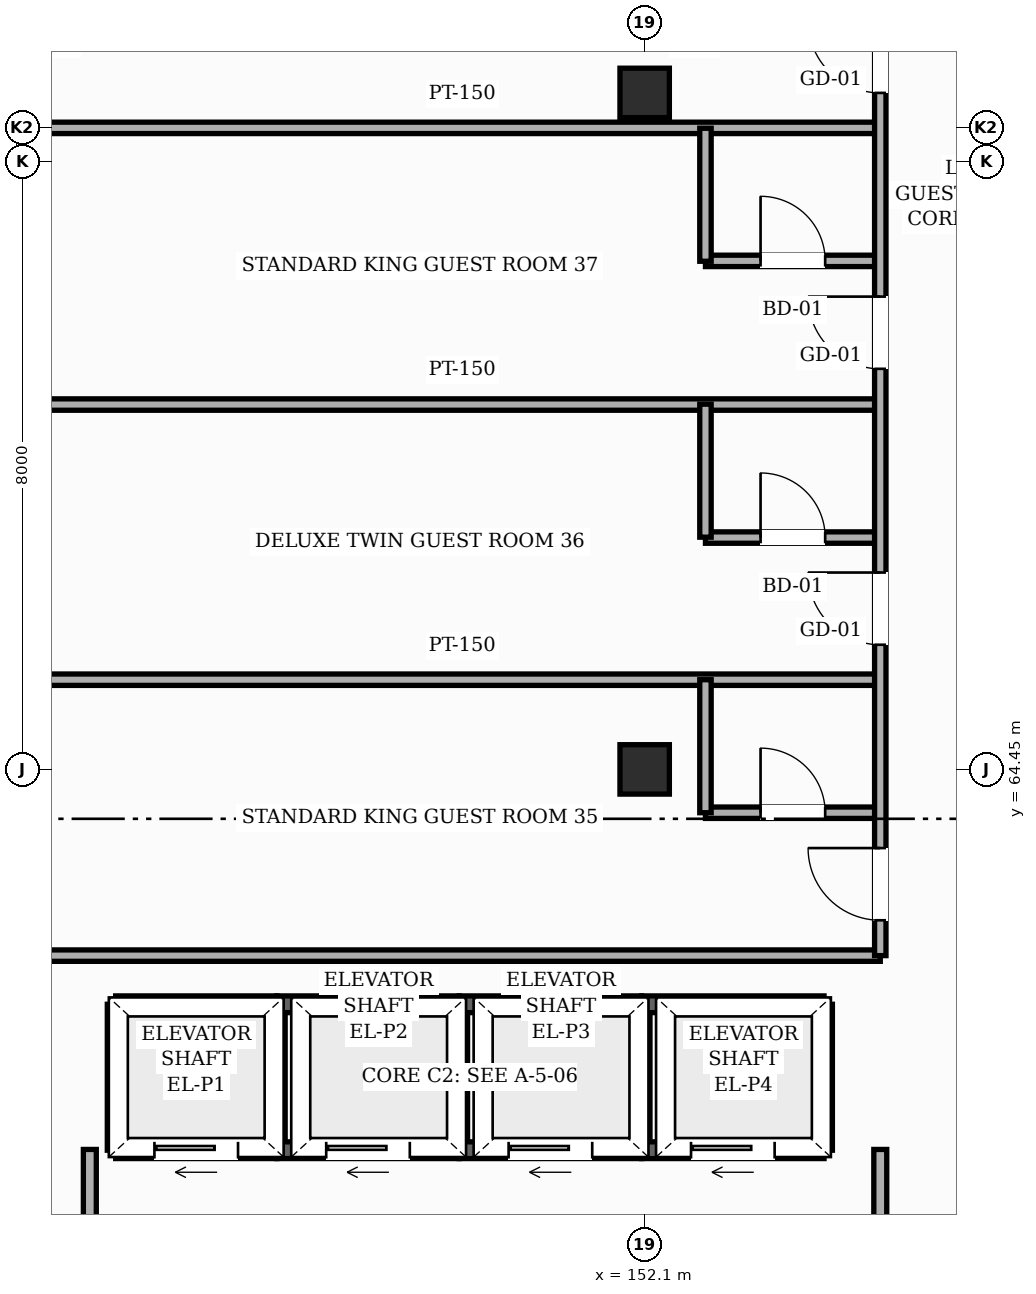
"""IFC4 building model, lengths in metres.
Left out: names, types, materials, properties, quantities, classifications, styles, units other than length and angle.
Written with IfcOpenShell. Run it as: python <this file> out.ifc"""

import sys

from ifc_helpers import new_model, si_unit, direction, frame, frame_2d, origin, origin_2d, place, context, subcontext, project, spatial, rectangle, hollow_rectangle, extrude, element, fill, save


model = new_model("IFC4")
c1 = context("Model", 3, precision=1e-05, world=origin(), true_north=direction((0.0, 1.0)))
c2 = subcontext(c1, "Body", "Model", "MODEL_VIEW")
j1 = project(units=[si_unit("LENGTHUNIT", "METRE"), si_unit("PLANEANGLEUNIT", "RADIAN")], contexts=[c1])
p1 = place(None, origin())
s1 = spatial("IfcSite", under=j1, at=p1, CompositionType="ELEMENT")
p2 = place(p1, origin())
s2 = spatial("IfcBuilding", under=s1, at=p2, CompositionType="ELEMENT")
p3 = place(p2, frame((0.0, 0.0, 19.8)))
s3 = spatial("IfcBuildingStorey", under=s2, at=p3, CompositionType="ELEMENT", Elevation=19.8)
p4 = place(p3, frame((152.1, 64.45, -0.24), z_axis=(0.0, 0.0, 1.0), x_axis=(1.0, 0.0, 0.0)))
e1 = element("IfcColumn", 1, at=p4, inside=s3, PredefinedType="COLUMN", context=c2, shape_type="SweptSolid", body=[
    extrude(hollow_rectangle(XDim=0.65, YDim=0.65, WallThickness=0.025, InnerFilletRadius=0.025, OuterFilletRadius=0.05, at=origin_2d()), origin(), (0.0, 0.0, 1.0), 5.04),
])
p5 = place(p3, frame((152.1, 73.35, 0.0), z_axis=(0.0, 0.0, 1.0), x_axis=(1.0, 0.0, 0.0)))
e2 = element("IfcColumn", 2, at=p5, inside=s3, PredefinedType="COLUMN", context=c2, shape_type="SweptSolid", body=[
    extrude(hollow_rectangle(XDim=0.65, YDim=0.65, WallThickness=0.025, InnerFilletRadius=0.025, OuterFilletRadius=0.05, at=origin_2d()), origin(), (0.0, 0.0, 1.0), 4.8),
])
p6 = place(p3, frame((145.14, 61.36, 0.0), z_axis=(0.0, 0.0, 1.0), x_axis=(1.0, 0.0, 0.0)))
e3 = element("IfcWall", 3, at=p6, inside=s3, PredefinedType="SHEAR", context=c2, shape_type="SweptSolid", body=[
    extrude(rectangle(XDim=2.12, YDim=0.22, at=frame_2d((1.06, 0.0))), origin(), (0.0, 0.0, 1.0), 4.58),
])
p7 = place(p3, frame((145.14, 59.44, 0.0), z_axis=(0.0, 0.0, 1.0), x_axis=(1.0, 0.0, 0.0)))
e4 = element("IfcWall", 4, at=p7, inside=s3, PredefinedType="SHEAR", context=c2, shape_type="SweptSolid", body=[
    extrude(rectangle(XDim=2.12, YDim=0.22, at=frame_2d((1.06, 0.0))), origin(), (0.0, 0.0, 1.0), 4.58),
])
p8 = place(p7, frame((0.51, 0.0, 0.0)))
e5 = element("IfcOpeningElement", 5, at=p8, cuts=e4, PredefinedType="OPENING", context=c2, shape_type="SweptSolid", body=[
    extrude(rectangle(XDim=1.1, YDim=2.2, at=frame_2d((0.55, 1.1))), frame((0.0, 0.12, 0.0), z_axis=(0.0, -1.0, 0.0), x_axis=(1.0, 0.0, 0.0)), (0.0, 0.0, 1.0), 0.24),
])
for number, where, z_axis, x_axis in (
    (6, (147.26, 59.44, 0.0), (0.0, 0.0, 1.0), (0.0, 1.0, 0.0)),
    (7, (145.14, 59.44, 0.0), (0.0, 0.0, 1.0), (0.0, 1.0, 0.0)),
):
    element("IfcWall", number, at=place(p3, frame(where, z_axis=z_axis, x_axis=x_axis)), inside=s3, PredefinedType="SHEAR", context=c2, shape_type="SweptSolid", body=[
        extrude(rectangle(XDim=1.92, YDim=0.22, at=frame_2d((0.96, 0.0))), origin(), (0.0, 0.0, 1.0), 4.58),
    ])
p9 = place(p3, frame((147.26, 61.36, 0.0), z_axis=(0.0, 0.0, 1.0), x_axis=(1.0, 0.0, 0.0)))
e8 = element("IfcWall", 8, at=p9, inside=s3, PredefinedType="SHEAR", context=c2, shape_type="SweptSolid", body=[
    extrude(rectangle(XDim=2.4, YDim=0.22, at=frame_2d((1.2, 0.0))), origin(), (0.0, 0.0, 1.0), 4.58),
])
p10 = place(p3, frame((147.26, 59.44, 0.0), z_axis=(0.0, 0.0, 1.0), x_axis=(1.0, 0.0, 0.0)))
e9 = element("IfcWall", 9, at=p10, inside=s3, PredefinedType="SHEAR", context=c2, shape_type="SweptSolid", body=[
    extrude(rectangle(XDim=2.4, YDim=0.22, at=frame_2d((1.2, 0.0))), origin(), (0.0, 0.0, 1.0), 4.58),
])
p11 = place(p10, frame((0.65, 0.0, 0.0)))
e10 = element("IfcOpeningElement", 10, at=p11, cuts=e9, PredefinedType="OPENING", context=c2, shape_type="SweptSolid", body=[
    extrude(rectangle(XDim=1.1, YDim=2.2, at=frame_2d((0.55, 1.1))), frame((0.0, 0.12, 0.0), z_axis=(0.0, -1.0, 0.0), x_axis=(1.0, 0.0, 0.0)), (0.0, 0.0, 1.0), 0.24),
])
p12 = place(p3, frame((149.66, 59.44, 0.0), z_axis=(0.0, 0.0, 1.0), x_axis=(0.0, 1.0, 0.0)))
e11 = element("IfcWall", 11, at=p12, inside=s3, PredefinedType="SHEAR", context=c2, shape_type="SweptSolid", body=[
    extrude(rectangle(XDim=1.92, YDim=0.22, at=frame_2d((0.96, 0.0))), origin(), (0.0, 0.0, 1.0), 4.58),
])
p13 = place(p3, frame((149.66, 61.36, 0.0), z_axis=(0.0, 0.0, 1.0), x_axis=(1.0, 0.0, 0.0)))
e12 = element("IfcWall", 12, at=p13, inside=s3, PredefinedType="SHEAR", context=c2, shape_type="SweptSolid", body=[
    extrude(rectangle(XDim=2.4, YDim=0.22, at=frame_2d((1.2, 0.0))), origin(), (0.0, 0.0, 1.0), 4.58),
])
p14 = place(p3, frame((149.66, 59.44, 0.0), z_axis=(0.0, 0.0, 1.0), x_axis=(1.0, 0.0, 0.0)))
e13 = element("IfcWall", 13, at=p14, inside=s3, PredefinedType="SHEAR", context=c2, shape_type="SweptSolid", body=[
    extrude(rectangle(XDim=2.4, YDim=0.22, at=frame_2d((1.2, 0.0))), origin(), (0.0, 0.0, 1.0), 4.58),
])
p15 = place(p14, frame((0.65, 0.0, 0.0)))
e14 = element("IfcOpeningElement", 14, at=p15, cuts=e13, PredefinedType="OPENING", context=c2, shape_type="SweptSolid", body=[
    extrude(rectangle(XDim=1.1, YDim=2.2, at=frame_2d((0.55, 1.1))), frame((0.0, 0.12, 0.0), z_axis=(0.0, -1.0, 0.0), x_axis=(1.0, 0.0, 0.0)), (0.0, 0.0, 1.0), 0.24),
])
p16 = place(p3, frame((152.06, 59.44, 0.0), z_axis=(0.0, 0.0, 1.0), x_axis=(0.0, 1.0, 0.0)))
e15 = element("IfcWall", 15, at=p16, inside=s3, PredefinedType="SHEAR", context=c2, shape_type="SweptSolid", body=[
    extrude(rectangle(XDim=1.92, YDim=0.22, at=frame_2d((0.96, 0.0))), origin(), (0.0, 0.0, 1.0), 4.58),
])
p17 = place(p3, frame((152.06, 61.36, 0.0), z_axis=(0.0, 0.0, 1.0), x_axis=(1.0, 0.0, 0.0)))
e16 = element("IfcWall", 16, at=p17, inside=s3, PredefinedType="SHEAR", context=c2, shape_type="SweptSolid", body=[
    extrude(rectangle(XDim=2.4, YDim=0.22, at=frame_2d((1.2, 0.0))), origin(), (0.0, 0.0, 1.0), 4.58),
])
p18 = place(p3, frame((152.06, 59.44, 0.0), z_axis=(0.0, 0.0, 1.0), x_axis=(1.0, 0.0, 0.0)))
e17 = element("IfcWall", 17, at=p18, inside=s3, PredefinedType="SHEAR", context=c2, shape_type="SweptSolid", body=[
    extrude(rectangle(XDim=2.4, YDim=0.22, at=frame_2d((1.2, 0.0))), origin(), (0.0, 0.0, 1.0), 4.58),
])
p19 = place(p18, frame((0.65, 0.0, 0.0)))
e18 = element("IfcOpeningElement", 18, at=p19, cuts=e17, PredefinedType="OPENING", context=c2, shape_type="SweptSolid", body=[
    extrude(rectangle(XDim=1.1, YDim=2.2, at=frame_2d((0.55, 1.1))), frame((0.0, 0.12, 0.0), z_axis=(0.0, -1.0, 0.0), x_axis=(1.0, 0.0, 0.0)), (0.0, 0.0, 1.0), 0.24),
])
p20 = place(p3, frame((154.46, 59.44, 0.0), z_axis=(0.0, 0.0, 1.0), x_axis=(0.0, 1.0, 0.0)))
e19 = element("IfcWall", 19, at=p20, inside=s3, PredefinedType="SHEAR", context=c2, shape_type="SweptSolid", body=[
    extrude(rectangle(XDim=1.92, YDim=0.22, at=frame_2d((0.96, 0.0))), origin(), (0.0, 0.0, 1.0), 4.58),
])
p21 = place(p3, frame((144.2, 62.0, 0.0), z_axis=(0.0, 0.0, 1.0), x_axis=(1.0, 0.0, 0.0)))
e20 = element("IfcWall", 20, at=p21, inside=s3, PredefinedType="PARTITIONING", context=c2, shape_type="SweptSolid", body=[
    extrude(rectangle(XDim=11.0, YDim=0.15, at=frame_2d((5.5, 0.0))), origin(), (0.0, 0.0, 1.0), 4.565),
])
p22 = place(p3, frame((152.9, 63.88, 0.0), z_axis=(0.0, 0.0, 1.0), x_axis=(1.0, 0.0, 0.0)))
e21 = element("IfcWall", 21, at=p22, inside=s3, PredefinedType="PARTITIONING", context=c2, shape_type="SweptSolid", body=[
    extrude(rectangle(XDim=2.3, YDim=0.15, at=frame_2d((1.15, 0.0))), origin(), (0.0, 0.0, 1.0), 4.565),
])
p23 = place(p22, frame((0.725, 0.0, 0.0)))
e22 = element("IfcOpeningElement", 22, at=p23, cuts=e21, PredefinedType="OPENING", context=c2, shape_type="SweptSolid", body=[
    extrude(rectangle(XDim=0.85, YDim=2.1, at=frame_2d((0.425, 1.05))), frame((0.0, 0.085, 0.0), z_axis=(0.0, -1.0, 0.0), x_axis=(1.0, 0.0, 0.0)), (0.0, 0.0, 1.0), 0.17),
])
p24 = place(p3, frame((144.2, 65.63, 0.0), z_axis=(0.0, 0.0, 1.0), x_axis=(1.0, 0.0, 0.0)))
e23 = element("IfcWall", 23, at=p24, inside=s3, PredefinedType="PARTITIONING", context=c2, shape_type="SweptSolid", body=[
    extrude(rectangle(XDim=11.0, YDim=0.15, at=frame_2d((5.5, 0.0))), origin(), (0.0, 0.0, 1.0), 4.565),
])
p25 = place(p3, frame((152.9, 67.5, 0.0), z_axis=(0.0, 0.0, 1.0), x_axis=(1.0, 0.0, 0.0)))
e24 = element("IfcWall", 24, at=p25, inside=s3, PredefinedType="PARTITIONING", context=c2, shape_type="SweptSolid", body=[
    extrude(rectangle(XDim=2.3, YDim=0.15, at=frame_2d((1.15, 0.0))), origin(), (0.0, 0.0, 1.0), 4.565),
])
p26 = place(p25, frame((0.725, 0.0, 0.0)))
e25 = element("IfcOpeningElement", 25, at=p26, cuts=e24, PredefinedType="OPENING", context=c2, shape_type="SweptSolid", body=[
    extrude(rectangle(XDim=0.85, YDim=2.1, at=frame_2d((0.425, 1.05))), frame((0.0, 0.085, 0.0), z_axis=(0.0, -1.0, 0.0), x_axis=(1.0, 0.0, 0.0)), (0.0, 0.0, 1.0), 0.17),
])
p27 = place(p3, frame((144.2, 69.25, 0.0), z_axis=(0.0, 0.0, 1.0), x_axis=(1.0, 0.0, 0.0)))
e26 = element("IfcWall", 26, at=p27, inside=s3, PredefinedType="PARTITIONING", context=c2, shape_type="SweptSolid", body=[
    extrude(rectangle(XDim=11.0, YDim=0.15, at=frame_2d((5.5, 0.0))), origin(), (0.0, 0.0, 1.0), 4.565),
])
p28 = place(p3, frame((152.9, 71.14, 0.0), z_axis=(0.0, 0.0, 1.0), x_axis=(1.0, 0.0, 0.0)))
e27 = element("IfcWall", 27, at=p28, inside=s3, PredefinedType="PARTITIONING", context=c2, shape_type="SweptSolid", body=[
    extrude(rectangle(XDim=2.3, YDim=0.15, at=frame_2d((1.15, 0.0))), origin(), (0.0, 0.0, 1.0), 4.565),
])
p29 = place(p28, frame((0.725, 0.0, 0.0)))
e28 = element("IfcOpeningElement", 28, at=p29, cuts=e27, PredefinedType="OPENING", context=c2, shape_type="SweptSolid", body=[
    extrude(rectangle(XDim=0.85, YDim=2.1, at=frame_2d((0.425, 1.05))), frame((0.0, 0.085, 0.0), z_axis=(0.0, -1.0, 0.0), x_axis=(1.0, 0.0, 0.0)), (0.0, 0.0, 1.0), 0.17),
])
p30 = place(p3, frame((144.2, 72.89, 0.0), z_axis=(0.0, 0.0, 1.0), x_axis=(1.0, 0.0, 0.0)))
e29 = element("IfcWall", 29, at=p30, inside=s3, PredefinedType="PARTITIONING", context=c2, shape_type="SweptSolid", body=[
    extrude(rectangle(XDim=11.0, YDim=0.15, at=frame_2d((5.5, 0.0))), origin(), (0.0, 0.0, 1.0), 4.565),
])
p31 = place(p3, frame((144.8, 53.0, 0.0), z_axis=(0.0, 0.0, 1.0), x_axis=(0.0, 1.0, 0.0)))
e30 = element("IfcWall", 30, at=p31, inside=s3, PredefinedType="PARTITIONING", context=c2, shape_type="SweptSolid", body=[
    extrude(rectangle(XDim=6.45, YDim=0.17, at=frame_2d((3.225, 0.0))), origin(), (0.0, 0.0, 1.0), 4.565),
])
for number, where, z_axis, x_axis in (
    (31, (152.9, 63.88, 0.0), (0.0, 0.0, 1.0), (0.0, 1.0, 0.0)),
    (32, (152.9, 67.505, 0.0), (0.0, 0.0, 1.0), (0.0, 1.0, 0.0)),
    (33, (152.9, 71.135, 0.0), (0.0, 0.0, 1.0), (0.0, 1.0, 0.0)),
):
    element("IfcWall", number, at=place(p3, frame(where, z_axis=z_axis, x_axis=x_axis)), inside=s3, PredefinedType="PARTITIONING", context=c2, shape_type="SweptSolid", body=[
        extrude(rectangle(XDim=1.75, YDim=0.15, at=frame_2d((0.875, 0.0))), origin(), (0.0, 0.0, 1.0), 4.565),
    ])
p32 = place(p3, frame((155.2, 53.0, 0.0), z_axis=(0.0, 0.0, 1.0), x_axis=(0.0, 1.0, 0.0)))
e34 = element("IfcWall", 34, at=p32, inside=s3, PredefinedType="PARTITIONING", context=c2, shape_type="SweptSolid", body=[
    extrude(rectangle(XDim=6.45, YDim=0.17, at=frame_2d((3.225, 0.0))), origin(), (0.0, 0.0, 1.0), 4.565),
])
p33 = place(p32, frame((2.625, 0.0, 0.0)))
e35 = element("IfcOpeningElement", 35, at=p33, cuts=e34, PredefinedType="OPENING", context=c2, shape_type="SweptSolid", body=[
    extrude(rectangle(XDim=1.2, YDim=2.2, at=frame_2d((0.6, 1.1))), frame((0.0, 0.095, 0.0), z_axis=(0.0, -1.0, 0.0), x_axis=(1.0, 0.0, 0.0)), (0.0, 0.0, 1.0), 0.19),
])
p34 = place(p3, frame((155.2, 62.0, 0.0), z_axis=(0.0, 0.0, 1.0), x_axis=(0.0, 1.0, 0.0)))
e36 = element("IfcWall", 36, at=p34, inside=s3, PredefinedType="PARTITIONING", context=c2, shape_type="SweptSolid", body=[
    extrude(rectangle(XDim=50.8, YDim=0.15, at=frame_2d((25.4, 0.0))), origin(), (0.0, 0.0, 1.0), 4.565),
])
p35 = place(p34, frame((0.465, 0.0, 0.0)))
e37 = element("IfcOpeningElement", 37, at=p35, cuts=e36, PredefinedType="OPENING", context=c2, shape_type="SweptSolid", body=[
    extrude(rectangle(XDim=0.95, YDim=2.15, at=frame_2d((0.475, 1.075))), frame((0.0, 0.085, 0.0), z_axis=(0.0, -1.0, 0.0), x_axis=(1.0, 0.0, 0.0)), (0.0, 0.0, 1.0), 0.17),
])
p36 = place(p34, frame((4.09, 0.0, 0.0)))
e38 = element("IfcOpeningElement", 38, at=p36, cuts=e36, PredefinedType="OPENING", context=c2, shape_type="SweptSolid", body=[
    extrude(rectangle(XDim=0.95, YDim=2.15, at=frame_2d((0.475, 1.075))), frame((0.0, 0.085, 0.0), z_axis=(0.0, -1.0, 0.0), x_axis=(1.0, 0.0, 0.0)), (0.0, 0.0, 1.0), 0.17),
])
p37 = place(p34, frame((7.72, 0.0, 0.0)))
e39 = element("IfcOpeningElement", 39, at=p37, cuts=e36, PredefinedType="OPENING", context=c2, shape_type="SweptSolid", body=[
    extrude(rectangle(XDim=0.95, YDim=2.15, at=frame_2d((0.475, 1.075))), frame((0.0, 0.085, 0.0), z_axis=(0.0, -1.0, 0.0), x_axis=(1.0, 0.0, 0.0)), (0.0, 0.0, 1.0), 0.17),
])
p38 = place(p34, frame((11.35, 0.0, 0.0)))
e40 = element("IfcOpeningElement", 40, at=p38, cuts=e36, PredefinedType="OPENING", context=c2, shape_type="SweptSolid", body=[
    extrude(rectangle(XDim=0.95, YDim=2.15, at=frame_2d((0.475, 1.075))), frame((0.0, 0.085, 0.0), z_axis=(0.0, -1.0, 0.0), x_axis=(1.0, 0.0, 0.0)), (0.0, 0.0, 1.0), 0.17),
])
p39 = place(p34, frame((14.98, 0.0, 0.0)))
e41 = element("IfcOpeningElement", 41, at=p39, cuts=e36, PredefinedType="OPENING", context=c2, shape_type="SweptSolid", body=[
    extrude(rectangle(XDim=0.95, YDim=2.15, at=frame_2d((0.475, 1.075))), frame((0.0, 0.085, 0.0), z_axis=(0.0, -1.0, 0.0), x_axis=(1.0, 0.0, 0.0)), (0.0, 0.0, 1.0), 0.17),
])
p40 = place(p34, frame((18.61, 0.0, 0.0)))
e42 = element("IfcOpeningElement", 42, at=p40, cuts=e36, PredefinedType="OPENING", context=c2, shape_type="SweptSolid", body=[
    extrude(rectangle(XDim=0.95, YDim=2.15, at=frame_2d((0.475, 1.075))), frame((0.0, 0.085, 0.0), z_axis=(0.0, -1.0, 0.0), x_axis=(1.0, 0.0, 0.0)), (0.0, 0.0, 1.0), 0.17),
])
p41 = place(p34, frame((22.235, 0.0, 0.0)))
e43 = element("IfcOpeningElement", 43, at=p41, cuts=e36, PredefinedType="OPENING", context=c2, shape_type="SweptSolid", body=[
    extrude(rectangle(XDim=0.95, YDim=2.15, at=frame_2d((0.475, 1.075))), frame((0.0, 0.085, 0.0), z_axis=(0.0, -1.0, 0.0), x_axis=(1.0, 0.0, 0.0)), (0.0, 0.0, 1.0), 0.17),
])
p42 = place(p34, frame((25.865, 0.0, 0.0)))
e44 = element("IfcOpeningElement", 44, at=p42, cuts=e36, PredefinedType="OPENING", context=c2, shape_type="SweptSolid", body=[
    extrude(rectangle(XDim=0.95, YDim=2.15, at=frame_2d((0.475, 1.075))), frame((0.0, 0.085, 0.0), z_axis=(0.0, -1.0, 0.0), x_axis=(1.0, 0.0, 0.0)), (0.0, 0.0, 1.0), 0.17),
])
p43 = place(p34, frame((29.49, 0.0, 0.0)))
e45 = element("IfcOpeningElement", 45, at=p43, cuts=e36, PredefinedType="OPENING", context=c2, shape_type="SweptSolid", body=[
    extrude(rectangle(XDim=0.95, YDim=2.15, at=frame_2d((0.475, 1.075))), frame((0.0, 0.085, 0.0), z_axis=(0.0, -1.0, 0.0), x_axis=(1.0, 0.0, 0.0)), (0.0, 0.0, 1.0), 0.17),
])
p44 = place(p34, frame((33.12, 0.0, 0.0)))
e46 = element("IfcOpeningElement", 46, at=p44, cuts=e36, PredefinedType="OPENING", context=c2, shape_type="SweptSolid", body=[
    extrude(rectangle(XDim=0.95, YDim=2.15, at=frame_2d((0.475, 1.075))), frame((0.0, 0.085, 0.0), z_axis=(0.0, -1.0, 0.0), x_axis=(1.0, 0.0, 0.0)), (0.0, 0.0, 1.0), 0.17),
])
p45 = place(p34, frame((36.75, 0.0, 0.0)))
e47 = element("IfcOpeningElement", 47, at=p45, cuts=e36, PredefinedType="OPENING", context=c2, shape_type="SweptSolid", body=[
    extrude(rectangle(XDim=0.95, YDim=2.15, at=frame_2d((0.475, 1.075))), frame((0.0, 0.085, 0.0), z_axis=(0.0, -1.0, 0.0), x_axis=(1.0, 0.0, 0.0)), (0.0, 0.0, 1.0), 0.17),
])
p46 = place(p34, frame((40.38, 0.0, 0.0)))
e48 = element("IfcOpeningElement", 48, at=p46, cuts=e36, PredefinedType="OPENING", context=c2, shape_type="SweptSolid", body=[
    extrude(rectangle(XDim=0.95, YDim=2.15, at=frame_2d((0.475, 1.075))), frame((0.0, 0.085, 0.0), z_axis=(0.0, -1.0, 0.0), x_axis=(1.0, 0.0, 0.0)), (0.0, 0.0, 1.0), 0.17),
])
p47 = place(p34, frame((44.01, 0.0, 0.0)))
e49 = element("IfcOpeningElement", 49, at=p47, cuts=e36, PredefinedType="OPENING", context=c2, shape_type="SweptSolid", body=[
    extrude(rectangle(XDim=0.95, YDim=2.15, at=frame_2d((0.475, 1.075))), frame((0.0, 0.085, 0.0), z_axis=(0.0, -1.0, 0.0), x_axis=(1.0, 0.0, 0.0)), (0.0, 0.0, 1.0), 0.17),
])
p48 = place(p34, frame((47.635, 0.0, 0.0)))
e50 = element("IfcOpeningElement", 50, at=p48, cuts=e36, PredefinedType="OPENING", context=c2, shape_type="SweptSolid", body=[
    extrude(rectangle(XDim=0.95, YDim=2.15, at=frame_2d((0.475, 1.075))), frame((0.0, 0.085, 0.0), z_axis=(0.0, -1.0, 0.0), x_axis=(1.0, 0.0, 0.0)), (0.0, 0.0, 1.0), 0.17),
])
p49 = place(p8, origin())
e51 = element("IfcDoor", 51, at=p49, inside=s3, OperationType="SLIDING_TO_LEFT", PredefinedType="DOOR", context=c2, shape_type="SweptSolid", body=[
    extrude(rectangle(XDim=1.1, YDim=2.2, at=frame_2d((0.55, 1.1))), frame((0.0, 0.025, 0.0), z_axis=(0.0, -1.0, 0.0), x_axis=(1.0, 0.0, 0.0)), (0.0, 0.0, 1.0), 0.05),
])
fill(e5, e51)
p50 = place(p11, origin())
e52 = element("IfcDoor", 52, at=p50, inside=s3, OperationType="SLIDING_TO_LEFT", PredefinedType="DOOR", context=c2, shape_type="SweptSolid", body=[
    extrude(rectangle(XDim=1.1, YDim=2.2, at=frame_2d((0.55, 1.1))), frame((0.0, 0.025, 0.0), z_axis=(0.0, -1.0, 0.0), x_axis=(1.0, 0.0, 0.0)), (0.0, 0.0, 1.0), 0.05),
])
fill(e10, e52)
p51 = place(p15, origin())
e53 = element("IfcDoor", 53, at=p51, inside=s3, OperationType="SLIDING_TO_LEFT", PredefinedType="DOOR", context=c2, shape_type="SweptSolid", body=[
    extrude(rectangle(XDim=1.1, YDim=2.2, at=frame_2d((0.55, 1.1))), frame((0.0, 0.025, 0.0), z_axis=(0.0, -1.0, 0.0), x_axis=(1.0, 0.0, 0.0)), (0.0, 0.0, 1.0), 0.05),
])
fill(e14, e53)
p52 = place(p19, origin())
e54 = element("IfcDoor", 54, at=p52, inside=s3, OperationType="SLIDING_TO_LEFT", PredefinedType="DOOR", context=c2, shape_type="SweptSolid", body=[
    extrude(rectangle(XDim=1.1, YDim=2.2, at=frame_2d((0.55, 1.1))), frame((0.0, 0.025, 0.0), z_axis=(0.0, -1.0, 0.0), x_axis=(1.0, 0.0, 0.0)), (0.0, 0.0, 1.0), 0.05),
])
fill(e18, e54)
p53 = place(p35, origin())
e55 = element("IfcDoor", 55, at=p53, inside=s3, OperationType="SINGLE_SWING_RIGHT", PredefinedType="DOOR", context=c2, shape_type="SweptSolid", body=[
    extrude(rectangle(XDim=0.95, YDim=2.15, at=frame_2d((0.475, 1.075))), frame((0.0, 0.025, 0.0), z_axis=(0.0, -1.0, 0.0), x_axis=(1.0, 0.0, 0.0)), (0.0, 0.0, 1.0), 0.05),
])
fill(e37, e55)
p54 = place(p23, origin())
e56 = element("IfcDoor", 56, at=p54, inside=s3, OperationType="SINGLE_SWING_LEFT", PredefinedType="DOOR", context=c2, shape_type="SweptSolid", body=[
    extrude(rectangle(XDim=0.85, YDim=2.1, at=frame_2d((0.425, 1.05))), frame((0.0, 0.025, 0.0), z_axis=(0.0, -1.0, 0.0), x_axis=(1.0, 0.0, 0.0)), (0.0, 0.0, 1.0), 0.05),
])
fill(e22, e56)
p55 = place(p36, origin())
e57 = element("IfcDoor", 57, at=p55, inside=s3, OperationType="SINGLE_SWING_RIGHT", PredefinedType="DOOR", context=c2, shape_type="SweptSolid", body=[
    extrude(rectangle(XDim=0.95, YDim=2.15, at=frame_2d((0.475, 1.075))), frame((0.0, 0.025, 0.0), z_axis=(0.0, -1.0, 0.0), x_axis=(1.0, 0.0, 0.0)), (0.0, 0.0, 1.0), 0.05),
])
fill(e38, e57)
p56 = place(p26, origin())
e58 = element("IfcDoor", 58, at=p56, inside=s3, OperationType="SINGLE_SWING_LEFT", PredefinedType="DOOR", context=c2, shape_type="SweptSolid", body=[
    extrude(rectangle(XDim=0.85, YDim=2.1, at=frame_2d((0.425, 1.05))), frame((0.0, 0.025, 0.0), z_axis=(0.0, -1.0, 0.0), x_axis=(1.0, 0.0, 0.0)), (0.0, 0.0, 1.0), 0.05),
])
fill(e25, e58)
p57 = place(p37, origin())
e59 = element("IfcDoor", 59, at=p57, inside=s3, OperationType="SINGLE_SWING_RIGHT", PredefinedType="DOOR", context=c2, shape_type="SweptSolid", body=[
    extrude(rectangle(XDim=0.95, YDim=2.15, at=frame_2d((0.475, 1.075))), frame((0.0, 0.025, 0.0), z_axis=(0.0, -1.0, 0.0), x_axis=(1.0, 0.0, 0.0)), (0.0, 0.0, 1.0), 0.05),
])
fill(e39, e59)
p58 = place(p29, origin())
e60 = element("IfcDoor", 60, at=p58, inside=s3, OperationType="SINGLE_SWING_LEFT", PredefinedType="DOOR", context=c2, shape_type="SweptSolid", body=[
    extrude(rectangle(XDim=0.85, YDim=2.1, at=frame_2d((0.425, 1.05))), frame((0.0, 0.025, 0.0), z_axis=(0.0, -1.0, 0.0), x_axis=(1.0, 0.0, 0.0)), (0.0, 0.0, 1.0), 0.05),
])
fill(e28, e60)
p59 = place(p38, origin())
e61 = element("IfcDoor", 61, at=p59, inside=s3, OperationType="SINGLE_SWING_RIGHT", PredefinedType="DOOR", context=c2, shape_type="SweptSolid", body=[
    extrude(rectangle(XDim=0.95, YDim=2.15, at=frame_2d((0.475, 1.075))), frame((0.0, 0.025, 0.0), z_axis=(0.0, -1.0, 0.0), x_axis=(1.0, 0.0, 0.0)), (0.0, 0.0, 1.0), 0.05),
])
fill(e40, e61)
save(model, sys.argv[1])
